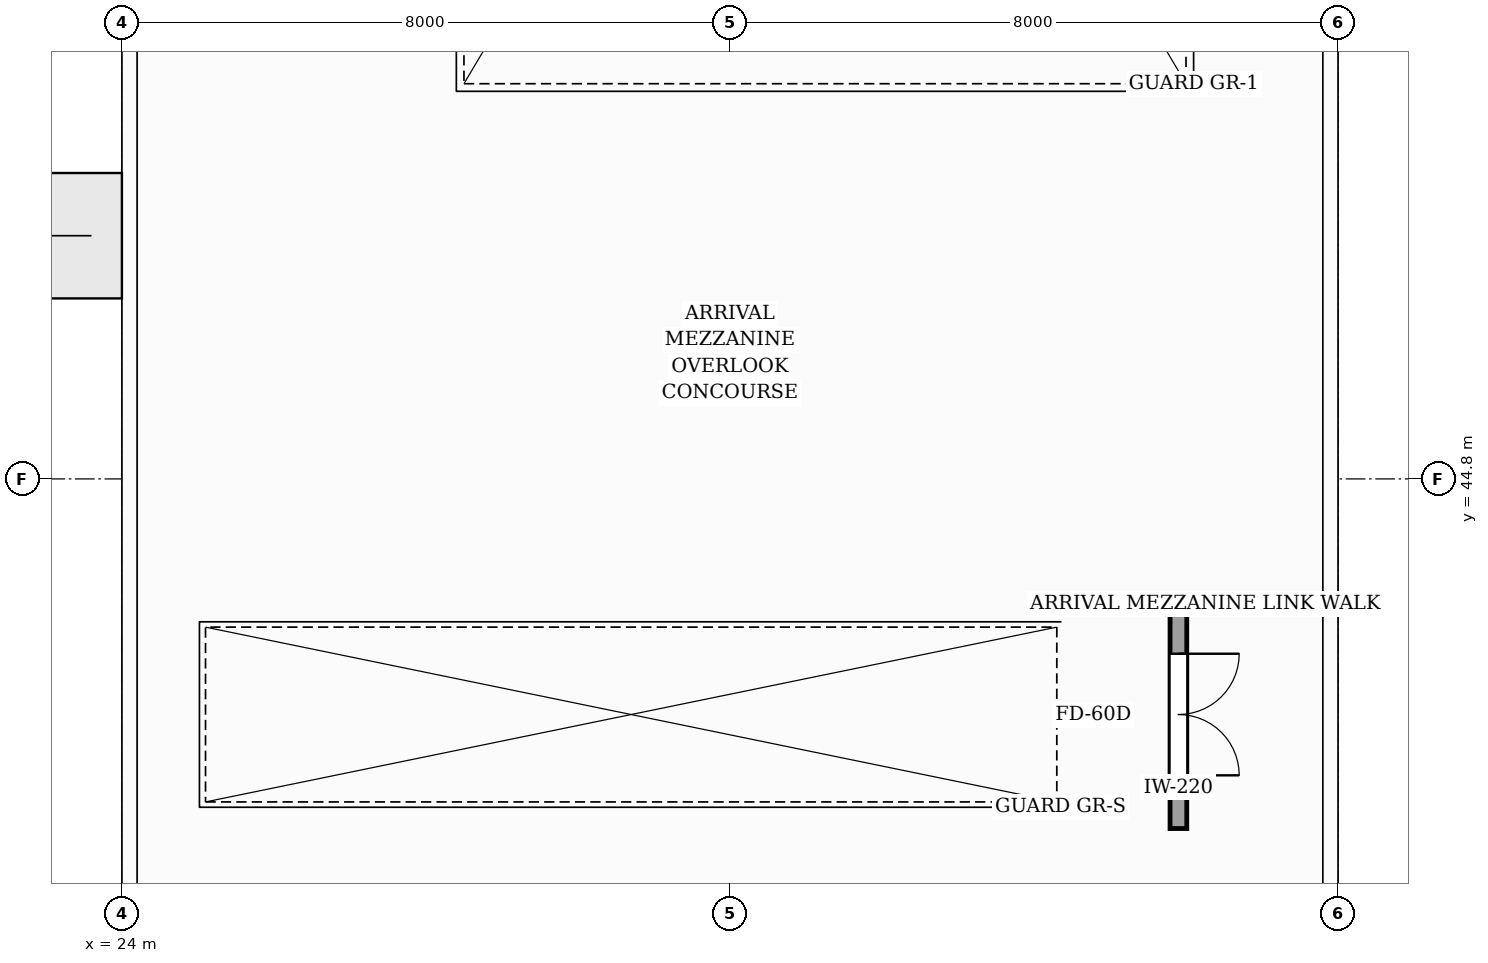
"""IFC4 building model, lengths in metres.
Left out: names, types, materials, properties, quantities, classifications, styles, units other than length and angle.
Written with IfcOpenShell. Run it as: python <this file> out.ifc"""

import sys

from ifc_helpers import new_model, si_unit, direction, frame, frame_2d, origin, place, context, subcontext, project, spatial, rectangle, extrude, element, fill, save


model = new_model("IFC4")
c1 = context("Model", 3, precision=1e-05, world=origin(), true_north=direction((0.0, 1.0)))
c2 = subcontext(c1, "Body", "Model", "MODEL_VIEW")
j1 = project(units=[si_unit("LENGTHUNIT", "METRE"), si_unit("PLANEANGLEUNIT", "RADIAN")], contexts=[c1])
p1 = place(None, origin())
s1 = spatial("IfcSite", under=j1, at=p1, CompositionType="ELEMENT")
p2 = place(p1, origin())
s2 = spatial("IfcBuilding", under=s1, at=p2, CompositionType="ELEMENT")
p3 = place(p2, frame((0.0, 0.0, 4.8)))
s3 = spatial("IfcBuildingStorey", under=s2, at=p3, CompositionType="ELEMENT", Elevation=4.8)
p4 = place(p3, frame((37.9, 40.2, 0.0), z_axis=(0.0, 0.0, 1.0), x_axis=(0.0, 1.0, 0.0)))
e1 = element("IfcWall", 1, at=p4, inside=s3, PredefinedType="SOLIDWALL", context=c2, shape_type="SweptSolid", body=[
    extrude(rectangle(XDim=3.0, YDim=0.22, at=frame_2d((1.5, 0.0))), origin(), (0.0, 0.0, 1.0), 2.8),
])
p5 = place(p4, frame((0.7, 0.0, 0.0)))
e2 = element("IfcOpeningElement", 2, at=p5, cuts=e1, PredefinedType="OPENING", context=c2, shape_type="SweptSolid", body=[
    extrude(rectangle(XDim=1.6, YDim=2.15, at=frame_2d((0.8, 1.075))), frame((0.0, 0.12, 0.0), z_axis=(0.0, -1.0, 0.0), x_axis=(1.0, 0.0, 0.0)), (0.0, 0.0, 1.0), 0.24),
])
p6 = place(p5, frame((1.6, 0.0, 0.0), z_axis=(0.0, 0.0, 1.0), x_axis=(-1.0, 0.0, 0.0)))
e3 = element("IfcDoor", 3, at=p6, inside=s3, OperationType="DOUBLE_DOOR_SINGLE_SWING", PredefinedType="DOOR", context=c2, shape_type="SweptSolid", body=[
    extrude(rectangle(XDim=1.6, YDim=2.15, at=frame_2d((0.8, 1.075))), frame((0.0, 0.025, 0.0), z_axis=(0.0, -1.0, 0.0), x_axis=(1.0, 0.0, 0.0)), (0.0, 0.0, 1.0), 0.05),
])
fill(e2, e3)
save(model, sys.argv[1])
